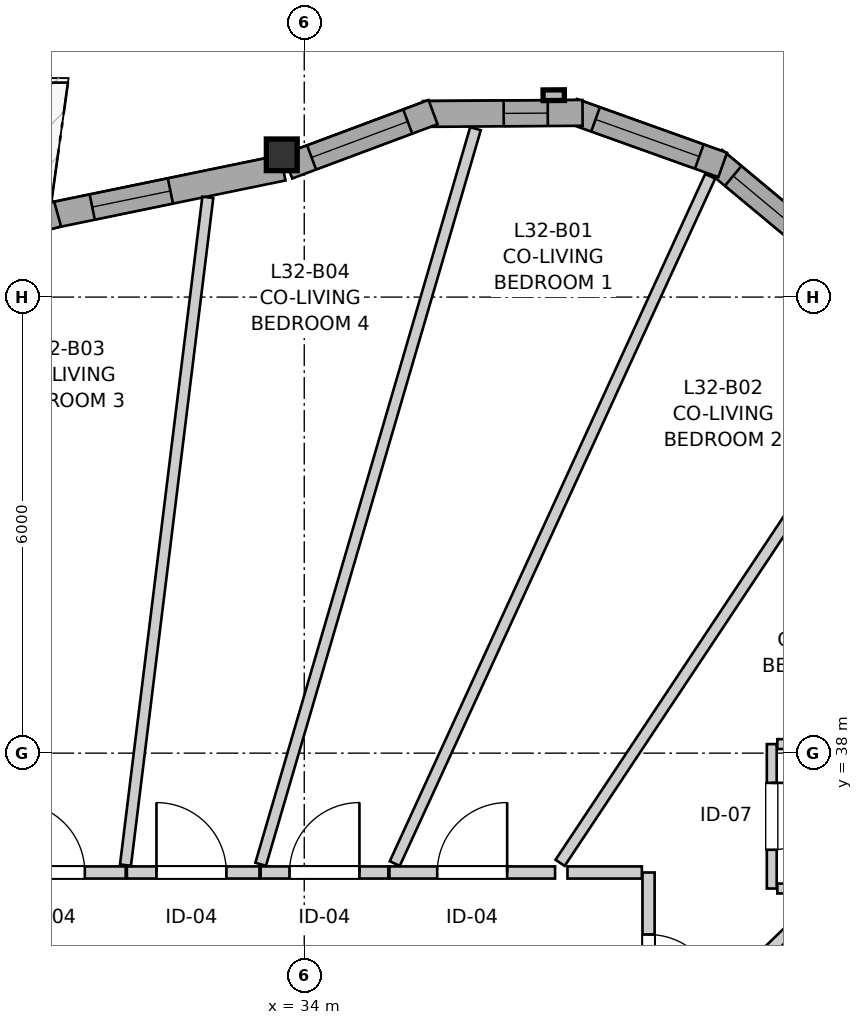
"""IFC4 building model, lengths in metres.
Left out: names, types, materials, properties, quantities, classifications, styles, units other than length and angle.
Written with IfcOpenShell. Run it as: python <this file> out.ifc"""

import sys

from ifc_helpers import new_model, si_unit, direction, frame, frame_2d, origin, origin_2d, place, context, subcontext, project, spatial, rectangle, i_section, extrude, source, transform, mapped, element, fill, save


model = new_model("IFC4")
c1 = context("Model", 3, precision=1e-05, world=origin(), true_north=direction((0.0, 1.0)))
c2 = subcontext(c1, "Body", "Model", "MODEL_VIEW")
j1 = project(units=[si_unit("LENGTHUNIT", "METRE"), si_unit("PLANEANGLEUNIT", "RADIAN")], contexts=[c1])
p1 = place(None, origin())
s1 = spatial("IfcSite", under=j1, at=p1, CompositionType="ELEMENT")
p2 = place(p1, origin())
s2 = spatial("IfcBuilding", under=s1, at=p2, CompositionType="ELEMENT")
p3 = place(p2, frame((0.0, 0.0, 108.8)))
s3 = spatial("IfcBuildingStorey", under=s2, at=p3, CompositionType="ELEMENT", Elevation=108.8)
m1 = source(origin(), c2, "Body", "SweptSolid", [
    extrude(i_section(OverallWidth=0.406, OverallDepth=0.416, WebThickness=0.027, FlangeThickness=0.044, FilletRadius=0.015, at=origin_2d()), origin(), (0.0, 0.0, 1.0), 2.935),
])
p4 = place(p3, frame((33.704, 45.872, 0.0), z_axis=(0.0, 0.0, 1.0), x_axis=(1.0, 0.0, 0.0)))
e1 = element("IfcColumn", 1, at=p4, inside=s3, PredefinedType="PILASTER", context=c2, shape_type="MappedRepresentation", body=[
    mapped(m1, transform((0.0, 0.0, 0.0), x_axis=(1.0, 0.0, 0.0), y_axis=(0.0, 1.0, 0.0), z_axis=(0.0, 0.0, 1.0), scale=1.0)),
])
p5 = place(p3, frame((41.002, 44.462, 0.0), z_axis=(0.0, 0.0, 1.0), x_axis=(-0.768488123124, 0.639864051669, 0.0)))
e2 = element("IfcWall", 2, at=p5, inside=s3, PredefinedType="SOLIDWALL", context=c2, shape_type="SweptSolid", body=[
    extrude(rectangle(XDim=2.099, YDim=0.34, at=frame_2d((1.05, 0.0))), origin(), (0.0, 0.0, 1.0), 2.465),
])
p6 = place(p5, frame((0.319, 0.0, 0.82)))
e3 = element("IfcOpeningElement", 3, at=p6, cuts=e2, PredefinedType="OPENING", context=c2, shape_type="SweptSolid", body=[
    extrude(rectangle(XDim=1.45, YDim=1.25, at=frame_2d((0.725, 0.625))), frame((0.0, 0.18, 0.0), z_axis=(0.0, -1.0, 0.0), x_axis=(1.0, 0.0, 0.0)), (0.0, 0.0, 1.0), 0.36),
])
p7 = place(p3, frame((39.506, 45.739, 0.0), z_axis=(0.0, 0.0, 1.0), x_axis=(-0.941486401639, 0.33705096874, 0.0)))
e4 = element("IfcWall", 4, at=p7, inside=s3, PredefinedType="SOLIDWALL", context=c2, shape_type="SweptSolid", body=[
    extrude(rectangle(XDim=2.099, YDim=0.34, at=frame_2d((1.05, 0.0))), origin(), (0.0, 0.0, 1.0), 2.465),
])
p8 = place(p7, frame((0.327, 0.0, 0.82)))
e5 = element("IfcOpeningElement", 5, at=p8, cuts=e4, PredefinedType="OPENING", context=c2, shape_type="SweptSolid", body=[
    extrude(rectangle(XDim=1.45, YDim=1.25, at=frame_2d((0.725, 0.625))), frame((0.0, 0.18, 0.0), z_axis=(0.0, -1.0, 0.0), x_axis=(1.0, 0.0, 0.0)), (0.0, 0.0, 1.0), 0.36),
])
p9 = place(p3, frame((37.662, 46.424, 0.0), z_axis=(0.0, 0.0, 1.0), x_axis=(-0.999976456891, -0.00686189939, 0.0)))
e6 = element("IfcWall", 6, at=p9, inside=s3, PredefinedType="SOLIDWALL", context=c2, shape_type="SweptSolid", body=[
    extrude(rectangle(XDim=2.099, YDim=0.34, at=frame_2d((1.05, 0.0))), origin(), (0.0, 0.0, 1.0), 2.465),
])
p10 = place(p9, frame((0.458, 0.0, 0.82)))
e7 = element("IfcOpeningElement", 7, at=p10, cuts=e6, PredefinedType="OPENING", context=c2, shape_type="SweptSolid", body=[
    extrude(rectangle(XDim=0.58, YDim=1.35, at=frame_2d((0.29, 0.675))), frame((0.0, 0.18, 0.0), z_axis=(0.0, -1.0, 0.0), x_axis=(1.0, 0.0, 0.0)), (0.0, 0.0, 1.0), 0.36),
])
p11 = place(p3, frame((35.695, 46.434, 0.0), z_axis=(0.0, 0.0, 1.0), x_axis=(-0.9368002254, -0.349864741994, 0.0)))
e8 = element("IfcWall", 8, at=p11, inside=s3, PredefinedType="SOLIDWALL", context=c2, shape_type="SweptSolid", body=[
    extrude(rectangle(XDim=2.041, YDim=0.34, at=frame_2d((1.021, 0.0))), origin(), (0.0, 0.0, 1.0), 2.465),
])
p12 = place(p11, frame((0.355, 0.0, 0.82)))
e9 = element("IfcOpeningElement", 9, at=p12, cuts=e8, PredefinedType="OPENING", context=c2, shape_type="SweptSolid", body=[
    extrude(rectangle(XDim=1.35, YDim=1.45, at=frame_2d((0.675, 0.725))), frame((0.0, 0.18, 0.0), z_axis=(0.0, -1.0, 0.0), x_axis=(1.0, 0.0, 0.0)), (0.0, 0.0, 1.0), 0.36),
])
p13 = place(p3, frame((33.719, 45.701, 0.0), z_axis=(0.0, 0.0, 1.0), x_axis=(-0.979417849231, -0.201843198072, 0.0)))
e10 = element("IfcWall", 10, at=p13, inside=s3, PredefinedType="SOLIDWALL", context=c2, shape_type="SweptSolid", body=[
    extrude(rectangle(XDim=3.113, YDim=0.34, at=frame_2d((1.557, 0.0))), origin(), (0.0, 0.0, 1.0), 2.465),
])
p14 = place(p13, frame((1.511, 0.0, 0.82)))
e11 = element("IfcOpeningElement", 11, at=p14, cuts=e10, PredefinedType="OPENING", context=c2, shape_type="SweptSolid", body=[
    extrude(rectangle(XDim=1.05, YDim=1.45, at=frame_2d((0.525, 0.725))), frame((0.0, 0.18, 0.0), z_axis=(0.0, -1.0, 0.0), x_axis=(1.0, 0.0, 0.0)), (0.0, 0.0, 1.0), 0.36),
])
p15 = place(p3, frame((30.755, 45.094, 0.0), z_axis=(0.0, 0.0, 1.0), x_axis=(-0.963040794714, -0.269355578589, 0.0)))
e12 = element("IfcWall", 12, at=p15, inside=s3, PredefinedType="SOLIDWALL", context=c2, shape_type="SweptSolid", body=[
    extrude(rectangle(XDim=2.839, YDim=0.34, at=frame_2d((1.419, 0.0))), origin(), (0.0, 0.0, 1.0), 2.465),
])
p16 = place(p15, frame((0.373, 0.0, 0.82)))
e13 = element("IfcOpeningElement", 13, at=p16, cuts=e12, PredefinedType="OPENING", context=c2, shape_type="SweptSolid", body=[
    extrude(rectangle(XDim=1.05, YDim=1.45, at=frame_2d((0.525, 0.725))), frame((0.0, 0.18, 0.0), z_axis=(0.0, -1.0, 0.0), x_axis=(1.0, 0.0, 0.0)), (0.0, 0.0, 1.0), 0.36),
])
p17 = place(p15, frame((1.792, 0.0, 0.82)))
e14 = element("IfcOpeningElement", 14, at=p17, cuts=e12, PredefinedType="OPENING", context=c2, shape_type="SweptSolid", body=[
    extrude(rectangle(XDim=0.58, YDim=1.35, at=frame_2d((0.29, 0.675))), frame((0.0, 0.18, 0.0), z_axis=(0.0, -1.0, 0.0), x_axis=(1.0, 0.0, 0.0)), (0.0, 0.0, 1.0), 0.36),
])
p18 = place(p3, frame((38.53, 36.43, 0.0), z_axis=(0.0, 0.0, 1.0), x_axis=(0.0, -1.0, 0.0)))
e15 = element("IfcWall", 15, at=p18, inside=s3, PredefinedType="PARTITIONING", context=c2, shape_type="SweptSolid", body=[
    extrude(rectangle(XDim=2.516, YDim=0.16, at=frame_2d((1.258, 0.0))), origin(), (0.0, 0.0, 1.0), 2.573),
])
p19 = place(p18, frame((0.816, 0.0, 0.0)))
e16 = element("IfcOpeningElement", 16, at=p19, cuts=e15, PredefinedType="OPENING", context=c2, shape_type="SweptSolid", body=[
    extrude(rectangle(XDim=0.92, YDim=2.1, at=frame_2d((0.46, 1.05))), frame((0.0, 0.09, 0.0), z_axis=(0.0, -1.0, 0.0), x_axis=(1.0, 0.0, 0.0)), (0.0, 0.0, 1.0), 0.18),
])
p20 = place(p3, frame((35.121, 36.43, 0.0), z_axis=(0.0, 0.0, 1.0), x_axis=(1.0, 0.0, 0.0)))
e17 = element("IfcWall", 17, at=p20, inside=s3, PredefinedType="PARTITIONING", context=c2, shape_type="SweptSolid", body=[
    extrude(rectangle(XDim=2.179, YDim=0.16, at=frame_2d((1.089, 0.0))), origin(), (0.0, 0.0, 1.0), 2.573),
])
p21 = place(p20, frame((0.628, 0.0, 0.0)))
e18 = element("IfcOpeningElement", 18, at=p21, cuts=e17, PredefinedType="OPENING", context=c2, shape_type="SweptSolid", body=[
    extrude(rectangle(XDim=0.92, YDim=2.1, at=frame_2d((0.46, 1.05))), frame((0.0, 0.09, 0.0), z_axis=(0.0, -1.0, 0.0), x_axis=(1.0, 0.0, 0.0)), (0.0, 0.0, 1.0), 0.18),
])
p22 = place(p3, frame((29.7, 36.43, 0.0), z_axis=(0.0, 0.0, 1.0), x_axis=(1.0, 0.0, 0.0)))
e19 = element("IfcWall", 19, at=p22, inside=s3, PredefinedType="PARTITIONING", context=c2, shape_type="SweptSolid", body=[
    extrude(rectangle(XDim=1.951, YDim=0.16, at=frame_2d((0.976, 0.0))), origin(), (0.0, 0.0, 1.0), 2.935),
])
p23 = place(p22, frame((0.493, 0.0, 0.0)))
e20 = element("IfcOpeningElement", 20, at=p23, cuts=e19, PredefinedType="OPENING", context=c2, shape_type="SweptSolid", body=[
    extrude(rectangle(XDim=0.92, YDim=2.1, at=frame_2d((0.46, 1.05))), frame((0.0, 0.09, 0.0), z_axis=(0.0, -1.0, 0.0), x_axis=(1.0, 0.0, 0.0)), (0.0, 0.0, 1.0), 0.18),
])
p24 = place(p3, frame((40.151, 38.119, 0.0), z_axis=(0.0, 0.0, 1.0), x_axis=(0.0, -1.0, 0.0)))
e21 = element("IfcWall", 21, at=p24, inside=s3, PredefinedType="PARTITIONING", context=c2, shape_type="SweptSolid", body=[
    extrude(rectangle(XDim=1.9, YDim=0.13, at=frame_2d((0.95, 0.0))), origin(), (0.0, 0.0, 1.0), 2.935),
])
p25 = place(p24, frame((0.51, 0.0, 0.0)))
e22 = element("IfcOpeningElement", 22, at=p25, cuts=e21, PredefinedType="OPENING", context=c2, shape_type="SweptSolid", body=[
    extrude(rectangle(XDim=0.88, YDim=2.05, at=frame_2d((0.44, 1.025))), frame((0.0, 0.075, 0.0), z_axis=(0.0, -1.0, 0.0), x_axis=(1.0, 0.0, 0.0)), (0.0, 0.0, 1.0), 0.15),
])
p26 = place(p3, frame((31.666, 36.43, 0.0), z_axis=(0.0, 0.0, 1.0), x_axis=(1.0, 0.0, 0.0)))
e23 = element("IfcWall", 23, at=p26, inside=s3, PredefinedType="PARTITIONING", context=c2, shape_type="SweptSolid", body=[
    extrude(rectangle(XDim=1.745, YDim=0.16, at=frame_2d((0.873, 0.0))), origin(), (0.0, 0.0, 1.0), 2.935),
])
p27 = place(p26, frame((0.389, 0.0, 0.0)))
e24 = element("IfcOpeningElement", 24, at=p27, cuts=e23, PredefinedType="OPENING", context=c2, shape_type="SweptSolid", body=[
    extrude(rectangle(XDim=0.92, YDim=2.1, at=frame_2d((0.46, 1.05))), frame((0.0, 0.09, 0.0), z_axis=(0.0, -1.0, 0.0), x_axis=(1.0, 0.0, 0.0)), (0.0, 0.0, 1.0), 0.18),
])
p28 = place(p3, frame((33.426, 36.43, 0.0), z_axis=(0.0, 0.0, 1.0), x_axis=(1.0, 0.0, 0.0)))
e25 = element("IfcWall", 25, at=p28, inside=s3, PredefinedType="PARTITIONING", context=c2, shape_type="SweptSolid", body=[
    extrude(rectangle(XDim=1.68, YDim=0.16, at=frame_2d((0.84, 0.0))), origin(), (0.0, 0.0, 1.0), 2.935),
])
p29 = place(p28, frame((0.38, 0.0, 0.0)))
e26 = element("IfcOpeningElement", 26, at=p29, cuts=e25, PredefinedType="OPENING", context=c2, shape_type="SweptSolid", body=[
    extrude(rectangle(XDim=0.92, YDim=2.1, at=frame_2d((0.46, 1.05))), frame((0.0, 0.09, 0.0), z_axis=(0.0, -1.0, 0.0), x_axis=(1.0, 0.0, 0.0)), (0.0, 0.0, 1.0), 0.18),
])
p30 = place(p3, frame((33.427, 36.538, 0.0), z_axis=(0.0, 0.0, 1.0), x_axis=(0.280326379037, 0.959904745908, 0.0)))
e27 = element("IfcWall", 27, at=p30, inside=s3, PredefinedType="PARTITIONING", context=c2, shape_type="SweptSolid", body=[
    extrude(rectangle(XDim=10.082, YDim=0.145, at=frame_2d((5.041, 0.0))), origin(), (0.0, 0.0, 1.0), 2.935),
])
p31 = place(p3, frame((35.191, 36.548, 0.0), z_axis=(0.0, 0.0, 1.0), x_axis=(0.417154036681, 0.908835799075, 0.0)))
e28 = element("IfcWall", 28, at=p31, inside=s3, PredefinedType="PARTITIONING", context=c2, shape_type="SweptSolid", body=[
    extrude(rectangle(XDim=9.949, YDim=0.145, at=frame_2d((4.974, 0.0))), origin(), (0.0, 0.0, 1.0), 2.935),
])
p32 = place(p3, frame((31.648, 36.527, 0.0), z_axis=(0.0, 0.0, 1.0), x_axis=(0.122371290087, 0.992484391496, 0.0)))
e29 = element("IfcWall", 29, at=p32, inside=s3, PredefinedType="PARTITIONING", context=c2, shape_type="SweptSolid", body=[
    extrude(rectangle(XDim=8.852, YDim=0.145, at=frame_2d((4.426, 0.0))), origin(), (0.0, 0.0, 1.0), 2.935),
])
p33 = place(p3, frame((37.366, 36.557, 0.0), z_axis=(0.0, 0.0, 1.0), x_axis=(0.553463679146, 0.832873313215, 0.0)))
e30 = element("IfcWall", 30, at=p33, inside=s3, PredefinedType="PARTITIONING", context=c2, shape_type="SweptSolid", body=[
    extrude(rectangle(XDim=7.704, YDim=0.145, at=frame_2d((3.852, 0.0))), origin(), (0.0, 0.0, 1.0), 2.935),
])
p34 = place(p3, frame((38.666, 34.009, 0.0), z_axis=(0.0, 0.0, 1.0), x_axis=(0.72031454127, 0.693647577402, 0.0)))
e31 = element("IfcWall", 31, at=p34, inside=s3, PredefinedType="PARTITIONING", context=c2, shape_type="SweptSolid", body=[
    extrude(rectangle(XDim=3.186, YDim=0.145, at=frame_2d((1.593, 0.0))), origin(), (0.0, 0.0, 1.0), 2.935),
])
p35 = place(p3, frame((40.224, 38.119, 0.0), z_axis=(0.0, 0.0, 1.0), x_axis=(1.0, 0.0, 0.0)))
e32 = element("IfcWall", 32, at=p35, inside=s3, PredefinedType="PARTITIONING", context=c2, shape_type="SweptSolid", body=[
    extrude(rectangle(XDim=1.727, YDim=0.13, at=frame_2d((0.863, 0.0))), origin(), (0.0, 0.0, 1.0), 2.935),
])
p36 = place(p3, frame((37.463, 36.43, 0.0), z_axis=(0.0, 0.0, 1.0), x_axis=(1.0, 0.0, 0.0)))
e33 = element("IfcWall", 33, at=p36, inside=s3, PredefinedType="PARTITIONING", context=c2, shape_type="SweptSolid", body=[
    extrude(rectangle(XDim=0.979, YDim=0.16, at=frame_2d((0.489, 0.0))), origin(), (0.0, 0.0, 1.0), 2.573),
])
p37 = place(p3, frame((40.224, 36.219, 0.0), z_axis=(0.0, 0.0, 1.0), x_axis=(1.0, 0.0, 0.0)))
e34 = element("IfcWall", 34, at=p37, inside=s3, PredefinedType="PARTITIONING", context=c2, shape_type="SweptSolid", body=[
    extrude(rectangle(XDim=0.557, YDim=0.13, at=frame_2d((0.278, 0.0))), origin(), (0.0, 0.0, 1.0), 2.935),
])
m2 = source(origin(), c2, "Body", "SweptSolid", [
    extrude(rectangle(XDim=1.45, YDim=1.25, at=frame_2d((0.725, 0.625))), frame((0.0, 0.03, 0.0), z_axis=(0.0, -1.0, 0.0), x_axis=(1.0, 0.0, 0.0)), (0.0, 0.0, 1.0), 0.06),
])
p38 = place(p6, origin())
e35 = element("IfcWindow", 35, at=p38, inside=s3, PartitioningType="SINGLE_PANEL", PredefinedType="WINDOW", context=c2, shape_type="MappedRepresentation", body=[
    mapped(m2, transform((0.0, 0.0, 0.0), x_axis=(1.0, 0.0, 0.0), y_axis=(0.0, 1.0, 0.0), z_axis=(0.0, 0.0, 1.0), scale=1.0)),
])
fill(e3, e35)
p39 = place(p8, origin())
e36 = element("IfcWindow", 36, at=p39, inside=s3, PartitioningType="SINGLE_PANEL", PredefinedType="WINDOW", context=c2, shape_type="MappedRepresentation", body=[
    mapped(m2, transform((0.0, 0.0, 0.0), x_axis=(1.0, 0.0, 0.0), y_axis=(0.0, 1.0, 0.0), z_axis=(0.0, 0.0, 1.0), scale=1.0)),
])
fill(e5, e36)
m3 = source(origin(), c2, "Body", "SweptSolid", [
    extrude(rectangle(XDim=0.58, YDim=1.35, at=frame_2d((0.29, 0.675))), frame((0.0, 0.03, 0.0), z_axis=(0.0, -1.0, 0.0), x_axis=(1.0, 0.0, 0.0)), (0.0, 0.0, 1.0), 0.06),
])
p40 = place(p10, origin())
e37 = element("IfcWindow", 37, at=p40, inside=s3, PartitioningType="SINGLE_PANEL", PredefinedType="WINDOW", context=c2, shape_type="MappedRepresentation", body=[
    mapped(m3, transform((0.0, 0.0, 0.0), x_axis=(1.0, 0.0, 0.0), y_axis=(0.0, 1.0, 0.0), z_axis=(0.0, 0.0, 1.0), scale=1.0)),
])
fill(e7, e37)
m4 = source(origin(), c2, "Body", "SweptSolid", [
    extrude(rectangle(XDim=1.35, YDim=1.45, at=frame_2d((0.675, 0.725))), frame((0.0, 0.03, 0.0), z_axis=(0.0, -1.0, 0.0), x_axis=(1.0, 0.0, 0.0)), (0.0, 0.0, 1.0), 0.06),
])
p41 = place(p12, origin())
e38 = element("IfcWindow", 38, at=p41, inside=s3, PartitioningType="SINGLE_PANEL", PredefinedType="WINDOW", context=c2, shape_type="MappedRepresentation", body=[
    mapped(m4, transform((0.0, 0.0, 0.0), x_axis=(1.0, 0.0, 0.0), y_axis=(0.0, 1.0, 0.0), z_axis=(0.0, 0.0, 1.0), scale=1.0)),
])
fill(e9, e38)
m5 = source(origin(), c2, "Body", "SweptSolid", [
    extrude(rectangle(XDim=1.05, YDim=1.45, at=frame_2d((0.525, 0.725))), frame((0.0, 0.03, 0.0), z_axis=(0.0, -1.0, 0.0), x_axis=(1.0, 0.0, 0.0)), (0.0, 0.0, 1.0), 0.06),
])
p42 = place(p14, origin())
e39 = element("IfcWindow", 39, at=p42, inside=s3, PartitioningType="SINGLE_PANEL", PredefinedType="WINDOW", context=c2, shape_type="MappedRepresentation", body=[
    mapped(m5, transform((0.0, 0.0, 0.0), x_axis=(1.0, 0.0, 0.0), y_axis=(0.0, 1.0, 0.0), z_axis=(0.0, 0.0, 1.0), scale=1.0)),
])
fill(e11, e39)
m6 = source(origin(), c2, "Body", "SweptSolid", [
    extrude(rectangle(XDim=0.92, YDim=2.1, at=frame_2d((0.46, 1.05))), frame((0.0, 0.025, 0.0), z_axis=(0.0, -1.0, 0.0), x_axis=(1.0, 0.0, 0.0)), (0.0, 0.0, 1.0), 0.05),
])
p43 = place(p19, origin())
e40 = element("IfcDoor", 40, at=p43, inside=s3, OperationType="SINGLE_SWING_RIGHT", PredefinedType="DOOR", context=c2, shape_type="MappedRepresentation", body=[
    mapped(m6, transform((0.0, 0.0, 0.0), x_axis=(1.0, 0.0, 0.0), y_axis=(0.0, 1.0, 0.0), z_axis=(0.0, 0.0, 1.0), scale=1.0)),
])
fill(e16, e40)
p44 = place(p21, origin())
e41 = element("IfcDoor", 41, at=p44, inside=s3, OperationType="SINGLE_SWING_RIGHT", PredefinedType="DOOR", context=c2, shape_type="MappedRepresentation", body=[
    mapped(m6, transform((0.0, 0.0, 0.0), x_axis=(1.0, 0.0, 0.0), y_axis=(0.0, 1.0, 0.0), z_axis=(0.0, 0.0, 1.0), scale=1.0)),
])
fill(e18, e41)
p45 = place(p23, origin())
e42 = element("IfcDoor", 42, at=p45, inside=s3, OperationType="SINGLE_SWING_LEFT", PredefinedType="DOOR", context=c2, shape_type="MappedRepresentation", body=[
    mapped(m6, transform((0.0, 0.0, 0.0), x_axis=(1.0, 0.0, 0.0), y_axis=(0.0, 1.0, 0.0), z_axis=(0.0, 0.0, 1.0), scale=1.0)),
])
fill(e20, e42)
m7 = source(origin(), c2, "Body", "SweptSolid", [
    extrude(rectangle(XDim=0.88, YDim=2.05, at=frame_2d((0.44, 1.025))), frame((0.0, 0.025, 0.0), z_axis=(0.0, -1.0, 0.0), x_axis=(1.0, 0.0, 0.0)), (0.0, 0.0, 1.0), 0.05),
])
p46 = place(p25, origin())
e43 = element("IfcDoor", 43, at=p46, inside=s3, OperationType="SINGLE_SWING_LEFT", PredefinedType="DOOR", context=c2, shape_type="MappedRepresentation", body=[
    mapped(m7, transform((0.0, 0.0, 0.0), x_axis=(1.0, 0.0, 0.0), y_axis=(0.0, 1.0, 0.0), z_axis=(0.0, 0.0, 1.0), scale=1.0)),
])
fill(e22, e43)
p47 = place(p27, origin())
e44 = element("IfcDoor", 44, at=p47, inside=s3, OperationType="SINGLE_SWING_LEFT", PredefinedType="DOOR", context=c2, shape_type="MappedRepresentation", body=[
    mapped(m6, transform((0.0, 0.0, 0.0), x_axis=(1.0, 0.0, 0.0), y_axis=(0.0, 1.0, 0.0), z_axis=(0.0, 0.0, 1.0), scale=1.0)),
])
fill(e24, e44)
p48 = place(p29, origin())
e45 = element("IfcDoor", 45, at=p48, inside=s3, OperationType="SINGLE_SWING_RIGHT", PredefinedType="DOOR", context=c2, shape_type="MappedRepresentation", body=[
    mapped(m6, transform((0.0, 0.0, 0.0), x_axis=(1.0, 0.0, 0.0), y_axis=(0.0, 1.0, 0.0), z_axis=(0.0, 0.0, 1.0), scale=1.0)),
])
fill(e26, e45)
save(model, sys.argv[1])
